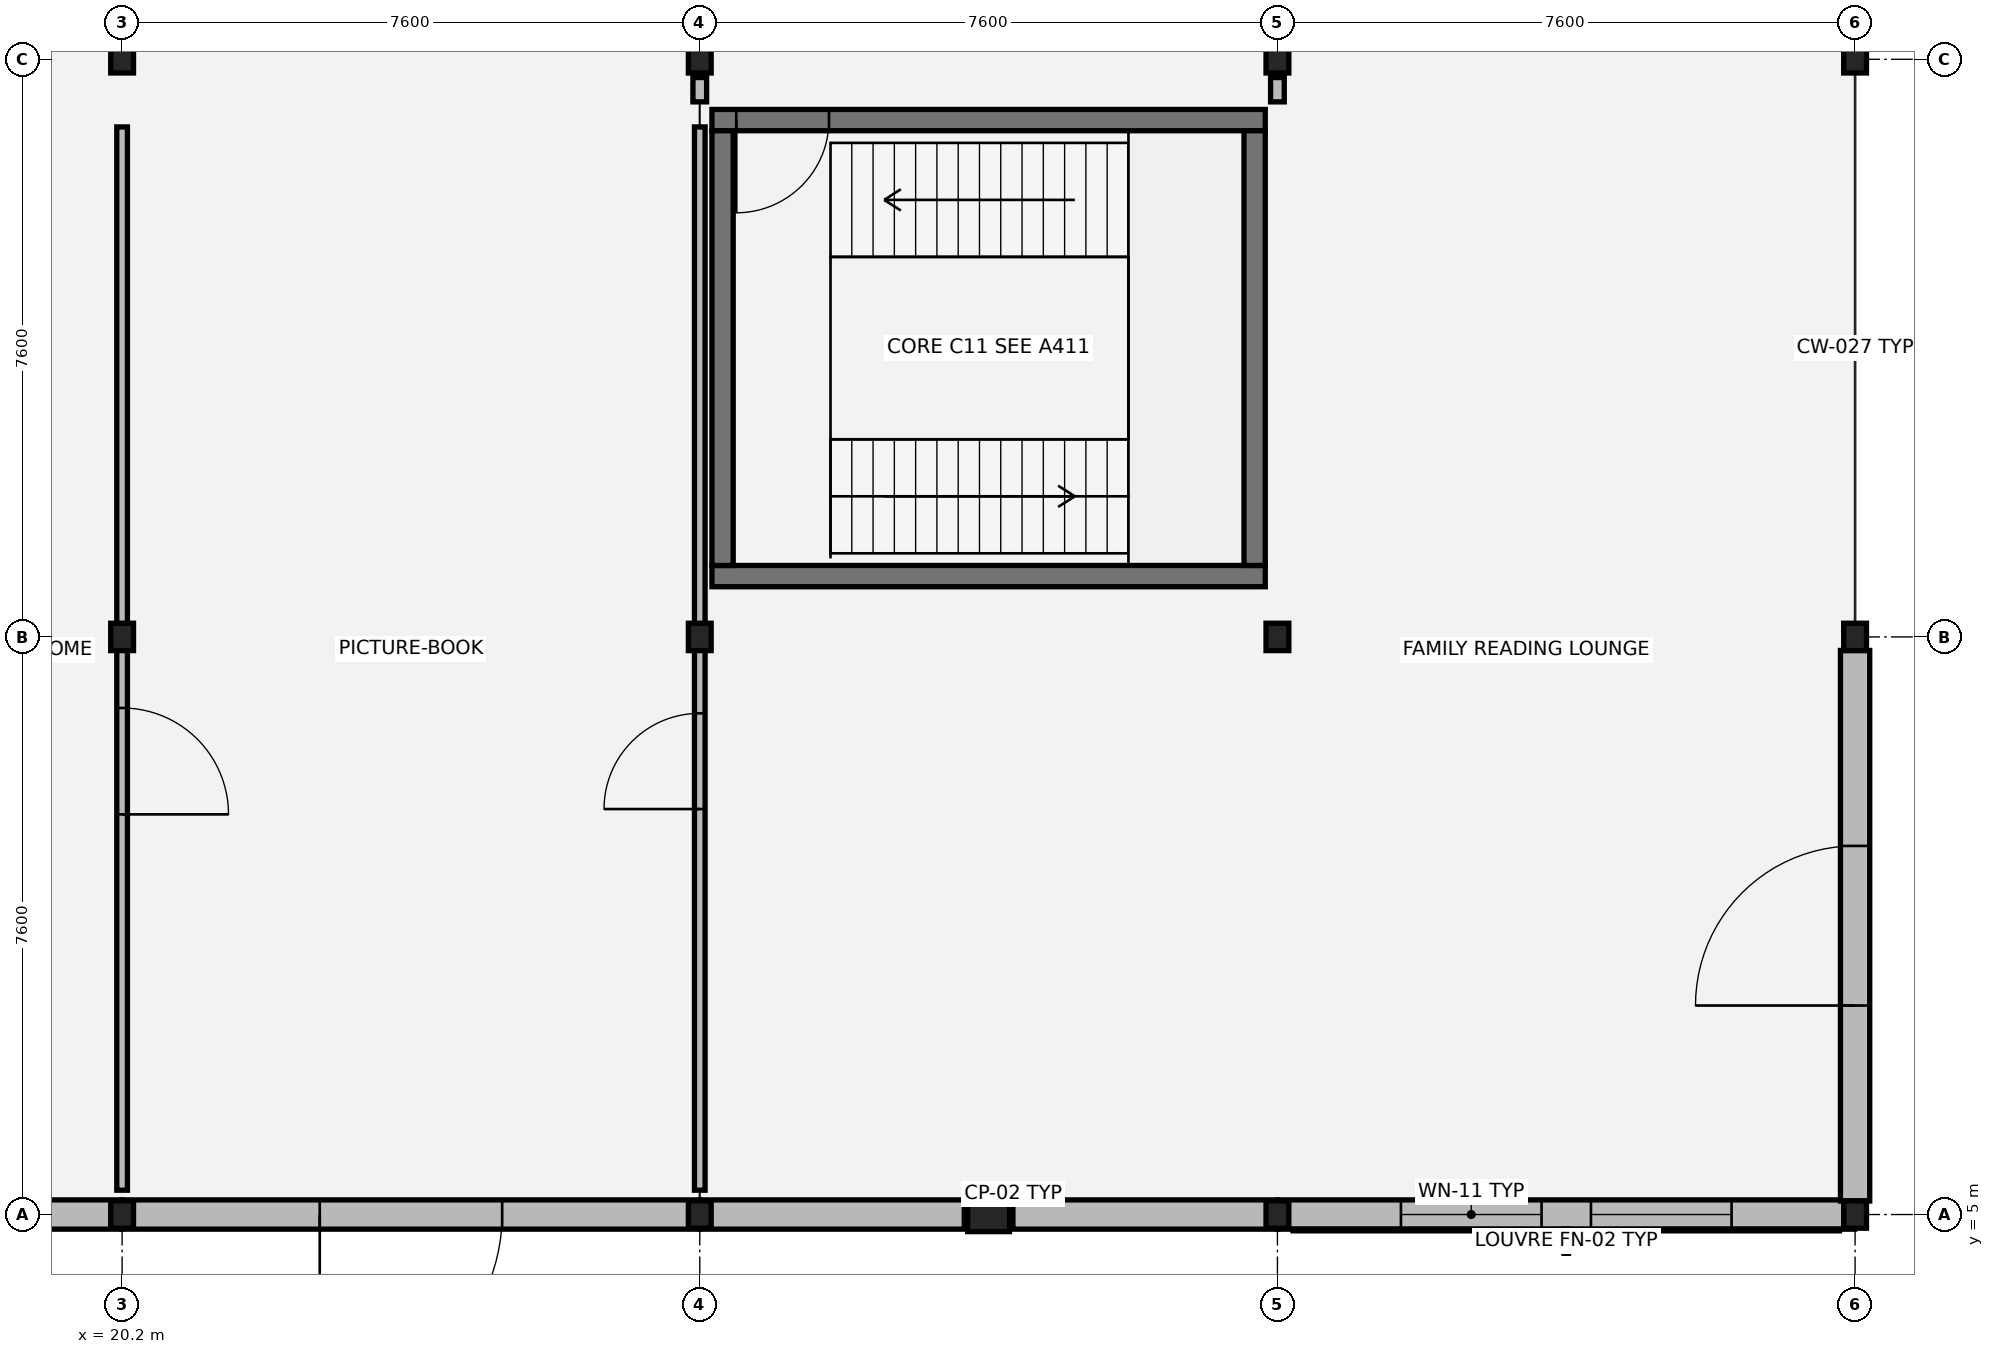
"""IFC4 building model, lengths in metres.
Left out: names, types, materials, properties, quantities, classifications, styles, units other than length and angle.
Written with IfcOpenShell. Run it as: python <this file> out.ifc"""

import sys

from ifc_helpers import new_model, si_unit, direction, frame, frame_2d, origin, origin_2d, place, context, subcontext, project, spatial, rectangle, i_section, extrude, element, fill, save


model = new_model("IFC4")
c1 = context("Model", 3, precision=1e-05, world=origin(), true_north=direction((0.0, 1.0)))
c2 = subcontext(c1, "Body", "Model", "MODEL_VIEW")
j1 = project(units=[si_unit("LENGTHUNIT", "METRE"), si_unit("PLANEANGLEUNIT", "RADIAN")], contexts=[c1])
p1 = place(None, origin())
s1 = spatial("IfcSite", under=j1, at=p1, CompositionType="ELEMENT")
p2 = place(p1, origin())
s2 = spatial("IfcBuilding", under=s1, at=p2, CompositionType="ELEMENT")
p3 = place(p2, origin())
s3 = spatial("IfcBuildingStorey", under=s2, at=p3, CompositionType="ELEMENT", Elevation=0.0)
for number, where, z_axis, x_axis in (
    (1, (20.2, 5.0, 0.0), (0.0, 0.0, 1.0), (1.0, 0.0, 0.0)),
    (2, (20.2, 12.6, 0.0), (0.0, 0.0, 1.0), (1.0, 0.0, 0.0)),
    (3, (20.2, 20.2, 0.0), (0.0, 0.0, 1.0), (1.0, 0.0, 0.0)),
    (4, (27.8, 5.0, 0.0), (0.0, 0.0, 1.0), (1.0, 0.0, 0.0)),
    (5, (27.8, 12.6, 0.0), (0.0, 0.0, 1.0), (1.0, 0.0, 0.0)),
    (6, (27.8, 20.2, 0.0), (0.0, 0.0, 1.0), (1.0, 0.0, 0.0)),
    (7, (35.4, 5.0, 0.0), (0.0, 0.0, 1.0), (1.0, 0.0, 0.0)),
    (8, (35.4, 12.6, 0.0), (0.0, 0.0, 1.0), (1.0, 0.0, 0.0)),
    (9, (35.4, 20.2, 0.0), (0.0, 0.0, 1.0), (1.0, 0.0, 0.0)),
    (10, (43.0, 5.0, 0.0), (0.0, 0.0, 1.0), (1.0, 0.0, 0.0)),
    (11, (43.0, 12.6, 0.0), (0.0, 0.0, 1.0), (1.0, 0.0, 0.0)),
    (12, (43.0, 20.2, 0.0), (0.0, 0.0, 1.0), (1.0, 0.0, 0.0)),
):
    element("IfcColumn", number, at=place(p3, frame(where, z_axis=z_axis, x_axis=x_axis)), inside=s3, PredefinedType="COLUMN", context=c2, shape_type="SweptSolid", body=[
        extrude(i_section(OverallWidth=0.3, OverallDepth=0.36, WebThickness=0.012, FlangeThickness=0.022, at=origin_2d()), origin(), (0.0, 0.0, 1.0), 5.075),
    ])
p4 = place(p3, frame((31.6, 5.0, 0.0), z_axis=(0.0, 0.0, 1.0), x_axis=(1.0, 0.0, 0.0)))
e13 = element("IfcColumn", 13, at=p4, inside=s3, PredefinedType="PILASTER", context=c2, shape_type="SweptSolid", body=[
    extrude(rectangle(XDim=0.55, YDim=0.45, at=origin_2d()), origin(), (0.0, 0.0, 1.0), 4.845),
])
p5 = place(p3, frame((16.72, 5.0, 0.0), z_axis=(0.0, 0.0, 1.0), x_axis=(1.0, 0.0, 0.0)))
e14 = element("IfcWall", 14, at=p5, inside=s3, PredefinedType="SOLIDWALL", context=c2, shape_type="SweptSolid", body=[
    extrude(rectangle(XDim=3.475, YDim=0.385, at=frame_2d((1.738, 0.0))), origin(), (0.0, 0.0, 1.0), 4.5),
])
p6 = place(p3, frame((20.205, 5.0, 0.0), z_axis=(0.0, 0.0, 1.0), x_axis=(1.0, 0.0, 0.0)))
e15 = element("IfcWall", 15, at=p6, inside=s3, PredefinedType="SOLIDWALL", context=c2, shape_type="SweptSolid", body=[
    extrude(rectangle(XDim=7.59, YDim=0.385, at=frame_2d((3.795, 0.0))), origin(), (0.0, 0.0, 1.0), 4.5),
])
p7 = place(p6, frame((2.595, 0.0, 0.0)))
e16 = element("IfcOpeningElement", 16, at=p7, cuts=e15, PredefinedType="OPENING", context=c2, shape_type="SweptSolid", body=[
    extrude(rectangle(XDim=2.4, YDim=2.6, at=frame_2d((1.2, 1.3))), frame((0.0, 0.202, 0.0), z_axis=(0.0, -1.0, 0.0), x_axis=(1.0, 0.0, 0.0)), (0.0, 0.0, 1.0), 0.405),
])
for number, where, z_axis, x_axis in (
    (17, (27.805, 5.0, 0.0), (0.0, 0.0, 1.0), (1.0, 0.0, 0.0)),
    (18, (31.92, 5.0, 0.0), (0.0, 0.0, 1.0), (1.0, 0.0, 0.0)),
):
    element("IfcWall", number, at=place(p3, frame(where, z_axis=z_axis, x_axis=x_axis)), inside=s3, PredefinedType="SOLIDWALL", context=c2, shape_type="SweptSolid", body=[
        extrude(rectangle(XDim=3.475, YDim=0.385, at=frame_2d((1.738, 0.0))), origin(), (0.0, 0.0, 1.0), 4.5),
    ])
p8 = place(p3, frame((35.405, 5.0, 0.0), z_axis=(0.0, 0.0, 1.0), x_axis=(1.0, 0.0, 0.0)))
e19 = element("IfcWall", 19, at=p8, inside=s3, PredefinedType="SOLIDWALL", context=c2, shape_type="SweptSolid", body=[
    extrude(rectangle(XDim=7.59, YDim=0.385, at=frame_2d((3.795, 0.0))), origin(), (0.0, 0.0, 1.0), 4.5),
])
p9 = place(p8, frame((1.62, 0.0, 0.8)))
e20 = element("IfcOpeningElement", 20, at=p9, cuts=e19, PredefinedType="OPENING", context=c2, shape_type="SweptSolid", body=[
    extrude(rectangle(XDim=1.85, YDim=2.1, at=frame_2d((0.925, 1.05))), frame((0.0, 0.202, 0.0), z_axis=(0.0, -1.0, 0.0), x_axis=(1.0, 0.0, 0.0)), (0.0, 0.0, 1.0), 0.405),
])
p10 = place(p8, frame((4.12, 0.0, 0.8)))
e21 = element("IfcOpeningElement", 21, at=p10, cuts=e19, PredefinedType="OPENING", context=c2, shape_type="SweptSolid", body=[
    extrude(rectangle(XDim=1.85, YDim=2.1, at=frame_2d((0.925, 1.05))), frame((0.0, 0.202, 0.0), z_axis=(0.0, -1.0, 0.0), x_axis=(1.0, 0.0, 0.0)), (0.0, 0.0, 1.0), 0.405),
])
p11 = place(p3, frame((43.0, 5.178, 0.0), z_axis=(0.0, 0.0, 1.0), x_axis=(0.0, 1.0, 0.0)))
e22 = element("IfcWall", 22, at=p11, inside=s3, PredefinedType="SOLIDWALL", context=c2, shape_type="SweptSolid", body=[
    extrude(rectangle(XDim=7.244, YDim=0.385, at=frame_2d((3.622, 0.0))), origin(), (0.0, 0.0, 1.0), 4.5),
])
p12 = place(p11, frame((2.572, 0.0, 0.0)))
e23 = element("IfcOpeningElement", 23, at=p12, cuts=e22, PredefinedType="OPENING", context=c2, shape_type="SweptSolid", body=[
    extrude(rectangle(XDim=2.1, YDim=2.48, at=frame_2d((1.05, 1.24))), frame((0.0, 0.202, 0.0), z_axis=(0.0, -1.0, 0.0), x_axis=(1.0, 0.0, 0.0)), (0.0, 0.0, 1.0), 0.405),
])
p13 = place(p3, frame((27.96, 13.4, 0.0), z_axis=(0.0, 0.0, 1.0), x_axis=(1.0, 0.0, 0.0)))
e24 = element("IfcWall", 24, at=p13, inside=s3, PredefinedType="SHEAR", context=c2, shape_type="SweptSolid", body=[
    extrude(rectangle(XDim=7.28, YDim=0.28, at=frame_2d((3.64, 0.0))), origin(), (0.0, 0.0, 1.0), 4.922),
])
p14 = place(p3, frame((27.96, 19.4, 0.0), z_axis=(0.0, 0.0, 1.0), x_axis=(1.0, 0.0, 0.0)))
e25 = element("IfcWall", 25, at=p14, inside=s3, PredefinedType="SHEAR", context=c2, shape_type="SweptSolid", body=[
    extrude(rectangle(XDim=7.28, YDim=0.28, at=frame_2d((3.64, 0.0))), origin(), (0.0, 0.0, 1.0), 4.922),
])
p15 = place(p14, frame((0.32, 0.0, 0.0)))
e26 = element("IfcOpeningElement", 26, at=p15, cuts=e25, PredefinedType="OPENING", context=c2, shape_type="SweptSolid", body=[
    extrude(rectangle(XDim=1.22, YDim=2.18, at=frame_2d((0.61, 1.09))), frame((0.0, 0.15, 0.0), z_axis=(0.0, -1.0, 0.0), x_axis=(1.0, 0.0, 0.0)), (0.0, 0.0, 1.0), 0.3),
])
for number, where, z_axis, x_axis in (
    (27, (28.1, 13.54, 0.0), (0.0, 0.0, 1.0), (0.0, 1.0, 0.0)),
    (28, (35.1, 13.54, 0.0), (0.0, 0.0, 1.0), (0.0, 1.0, 0.0)),
):
    element("IfcWall", number, at=place(p3, frame(where, z_axis=z_axis, x_axis=x_axis)), inside=s3, PredefinedType="SHEAR", context=c2, shape_type="SweptSolid", body=[
        extrude(rectangle(XDim=5.72, YDim=0.28, at=frame_2d((2.86, 0.0))), origin(), (0.0, 0.0, 1.0), 4.922),
    ])
for number, where, z_axis, x_axis in (
    (29, (27.8, 19.64, 0.0), (0.0, 0.0, 1.0), (0.0, 1.0, 0.0)),
    (30, (35.4, 19.64, 0.0), (0.0, 0.0, 1.0), (0.0, 1.0, 0.0)),
):
    element("IfcWall", number, at=place(p3, frame(where, z_axis=z_axis, x_axis=x_axis)), inside=s3, PredefinedType="PARTITIONING", context=c2, shape_type="SweptSolid", body=[
        extrude(rectangle(XDim=0.32, YDim=0.18, at=frame_2d((0.16, 0.0))), origin(), (0.0, 0.0, 1.0), 4.2),
    ])
p16 = place(p3, frame((20.2, 5.32, 0.0), z_axis=(0.0, 0.0, 1.0), x_axis=(0.0, 1.0, 0.0)))
e31 = element("IfcWall", 31, at=p16, inside=s3, PredefinedType="PARTITIONING", context=c2, shape_type="SweptSolid", body=[
    extrude(rectangle(XDim=13.99, YDim=0.14, at=frame_2d((6.995, 0.0))), origin(), (0.0, 0.0, 1.0), 4.2),
])
p17 = place(p16, frame((4.945, 0.0, 0.0)))
e32 = element("IfcOpeningElement", 32, at=p17, cuts=e31, PredefinedType="OPENING", context=c2, shape_type="SweptSolid", body=[
    extrude(rectangle(XDim=1.4, YDim=2.22, at=frame_2d((0.7, 1.11))), frame((0.0, 0.08, 0.0), z_axis=(0.0, -1.0, 0.0), x_axis=(1.0, 0.0, 0.0)), (0.0, 0.0, 1.0), 0.16),
])
p18 = place(p3, frame((27.8, 5.32, 0.0), z_axis=(0.0, 0.0, 1.0), x_axis=(0.0, 1.0, 0.0)))
e33 = element("IfcWall", 33, at=p18, inside=s3, PredefinedType="PARTITIONING", context=c2, shape_type="SweptSolid", body=[
    extrude(rectangle(XDim=13.99, YDim=0.14, at=frame_2d((6.995, 0.0))), origin(), (0.0, 0.0, 1.0), 2.445),
])
p19 = place(p18, frame((5.015, 0.0, 0.0)))
e34 = element("IfcOpeningElement", 34, at=p19, cuts=e33, PredefinedType="OPENING", context=c2, shape_type="SweptSolid", body=[
    extrude(rectangle(XDim=1.26, YDim=2.2, at=frame_2d((0.63, 1.1))), frame((0.0, 0.08, 0.0), z_axis=(0.0, -1.0, 0.0), x_axis=(1.0, 0.0, 0.0)), (0.0, 0.0, 1.0), 0.16),
])
p20 = place(p7, origin())
e35 = element("IfcDoor", 35, at=p20, inside=s3, OperationType="SINGLE_SWING_RIGHT", PredefinedType="DOOR", context=c2, shape_type="SweptSolid", body=[
    extrude(rectangle(XDim=2.4, YDim=2.6, at=frame_2d((1.2, 1.3))), frame((0.0, 0.025, 0.0), z_axis=(0.0, -1.0, 0.0), x_axis=(1.0, 0.0, 0.0)), (0.0, 0.0, 1.0), 0.05),
])
fill(e16, e35)
p21 = place(p9, origin())
e36 = element("IfcWindow", 36, at=p21, inside=s3, PartitioningType="SINGLE_PANEL", PredefinedType="WINDOW", context=c2, shape_type="SweptSolid", body=[
    extrude(rectangle(XDim=1.85, YDim=2.1, at=frame_2d((0.925, 1.05))), frame((0.0, 0.03, 0.0), z_axis=(0.0, -1.0, 0.0), x_axis=(1.0, 0.0, 0.0)), (0.0, 0.0, 1.0), 0.06),
])
fill(e20, e36)
p22 = place(p10, origin())
e37 = element("IfcWindow", 37, at=p22, inside=s3, PartitioningType="SINGLE_PANEL", PredefinedType="WINDOW", context=c2, shape_type="SweptSolid", body=[
    extrude(rectangle(XDim=1.85, YDim=2.1, at=frame_2d((0.925, 1.05))), frame((0.0, 0.03, 0.0), z_axis=(0.0, -1.0, 0.0), x_axis=(1.0, 0.0, 0.0)), (0.0, 0.0, 1.0), 0.06),
])
fill(e21, e37)
p23 = place(p12, origin())
e38 = element("IfcDoor", 38, at=p23, inside=s3, OperationType="SINGLE_SWING_LEFT", PredefinedType="DOOR", context=c2, shape_type="SweptSolid", body=[
    extrude(rectangle(XDim=2.1, YDim=2.48, at=frame_2d((1.05, 1.24))), frame((0.0, 0.025, 0.0), z_axis=(0.0, -1.0, 0.0), x_axis=(1.0, 0.0, 0.0)), (0.0, 0.0, 1.0), 0.05),
])
fill(e23, e38)
p24 = place(p15, origin())
e39 = element("IfcDoor", 39, at=p24, inside=s3, OperationType="SINGLE_SWING_RIGHT", PredefinedType="DOOR", context=c2, shape_type="SweptSolid", body=[
    extrude(rectangle(XDim=1.22, YDim=2.18, at=frame_2d((0.61, 1.09))), frame((0.0, 0.025, 0.0), z_axis=(0.0, -1.0, 0.0), x_axis=(1.0, 0.0, 0.0)), (0.0, 0.0, 1.0), 0.05),
])
fill(e26, e39)
p25 = place(p17, origin())
e40 = element("IfcDoor", 40, at=p25, inside=s3, OperationType="SINGLE_SWING_RIGHT", PredefinedType="DOOR", context=c2, shape_type="SweptSolid", body=[
    extrude(rectangle(XDim=1.4, YDim=2.22, at=frame_2d((0.7, 1.11))), frame((0.0, 0.025, 0.0), z_axis=(0.0, -1.0, 0.0), x_axis=(1.0, 0.0, 0.0)), (0.0, 0.0, 1.0), 0.05),
])
fill(e32, e40)
p26 = place(p19, origin())
e41 = element("IfcDoor", 41, at=p26, inside=s3, OperationType="SINGLE_SWING_LEFT", PredefinedType="DOOR", context=c2, shape_type="SweptSolid", body=[
    extrude(rectangle(XDim=1.26, YDim=2.2, at=frame_2d((0.63, 1.1))), frame((0.0, 0.025, 0.0), z_axis=(0.0, -1.0, 0.0), x_axis=(1.0, 0.0, 0.0)), (0.0, 0.0, 1.0), 0.05),
])
fill(e34, e41)
save(model, sys.argv[1])
